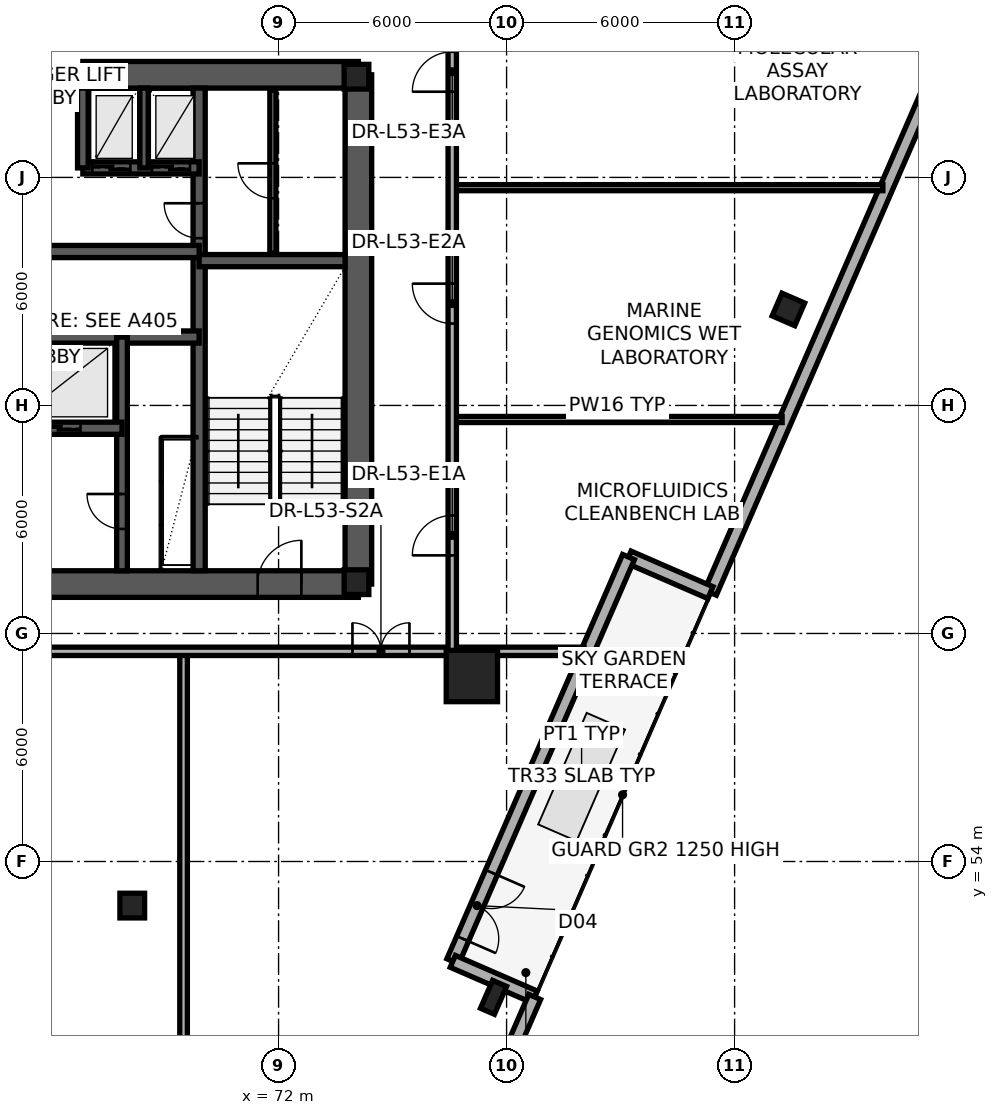
"""IFC4 building model, lengths in metres.
Left out: names, types, materials, properties, quantities, classifications, styles, units other than length and angle.
Written with IfcOpenShell. Run it as: python <this file> out.ifc"""

import sys

from ifc_helpers import new_model, si_unit, direction, frame, frame_2d, origin, origin_2d, place, context, subcontext, project, spatial, rectangle, extrude, element, fill, save


model = new_model("IFC4")
c1 = context("Model", 3, precision=1e-05, world=origin(), true_north=direction((0.0, 1.0)))
c2 = subcontext(c1, "Body", "Model", "MODEL_VIEW")
j1 = project(units=[si_unit("LENGTHUNIT", "METRE"), si_unit("PLANEANGLEUNIT", "RADIAN")], contexts=[c1])
p1 = place(None, origin())
s1 = spatial("IfcSite", under=j1, at=p1, CompositionType="ELEMENT")
p2 = place(p1, origin())
s2 = spatial("IfcBuilding", under=s1, at=p2, CompositionType="ELEMENT")
p3 = place(p2, frame((0.0, 0.0, 201.3)))
s3 = spatial("IfcBuildingStorey", under=s2, at=p3, CompositionType="ELEMENT", Elevation=201.3)
p4 = place(p3, frame((57.9, 61.3, 0.0), z_axis=(0.0, 0.0, 1.0), x_axis=(1.0, 0.0, 0.0)))
e1 = element("IfcWall", 1, at=p4, inside=s3, PredefinedType="SHEAR", context=c2, shape_type="SweptSolid", body=[
    extrude(rectangle(XDim=16.2, YDim=0.7, at=frame_2d((8.1, 0.0))), origin(), (0.0, 0.0, 1.0), 3.65),
])
p5 = place(p4, frame((1.35, 0.0, 0.0)))
e2 = element("IfcOpeningElement", 2, at=p5, cuts=e1, PredefinedType="OPENING", context=c2, shape_type="SweptSolid", body=[
    extrude(rectangle(XDim=1.15, YDim=2.15, at=frame_2d((0.575, 1.075))), frame((0.0, 0.36, 0.0), z_axis=(0.0, -1.0, 0.0), x_axis=(1.0, 0.0, 0.0)), (0.0, 0.0, 1.0), 0.72),
])
p6 = place(p4, frame((6.1, 0.0, 0.0)))
e3 = element("IfcOpeningElement", 3, at=p6, cuts=e1, PredefinedType="OPENING", context=c2, shape_type="SweptSolid", body=[
    extrude(rectangle(XDim=1.6, YDim=2.15, at=frame_2d((0.8, 1.075))), frame((0.0, 0.36, 0.0), z_axis=(0.0, -1.0, 0.0), x_axis=(1.0, 0.0, 0.0)), (0.0, 0.0, 1.0), 0.72),
])
p7 = place(p4, frame((13.55, 0.0, 0.0)))
e4 = element("IfcOpeningElement", 4, at=p7, cuts=e1, PredefinedType="OPENING", context=c2, shape_type="SweptSolid", body=[
    extrude(rectangle(XDim=1.15, YDim=2.15, at=frame_2d((0.575, 1.075))), frame((0.0, 0.36, 0.0), z_axis=(0.0, -1.0, 0.0), x_axis=(1.0, 0.0, 0.0)), (0.0, 0.0, 1.0), 0.72),
])
p8 = place(p3, frame((74.1, 61.3, 0.0), z_axis=(0.0, 0.0, 1.0), x_axis=(0.0, 1.0, 0.0)))
e5 = element("IfcWall", 5, at=p8, inside=s3, PredefinedType="SHEAR", context=c2, shape_type="SweptSolid", body=[
    extrude(rectangle(XDim=13.4, YDim=0.7, at=frame_2d((6.7, 0.0))), origin(), (0.0, 0.0, 1.0), 3.65),
])
p9 = place(p3, frame((74.1, 74.7, 0.0), z_axis=(0.0, 0.0, 1.0), x_axis=(-1.0, 0.0, 0.0)))
e6 = element("IfcWall", 6, at=p9, inside=s3, PredefinedType="SHEAR", context=c2, shape_type="SweptSolid", body=[
    extrude(rectangle(XDim=7.25, YDim=0.7, at=frame_2d((3.625, 0.0))), origin(), (0.0, 0.0, 1.0), 3.65),
])
p10 = place(p3, frame((69.91, 61.65, 0.0), z_axis=(0.0, 0.0, 1.0), x_axis=(0.0, 1.0, 0.0)))
e7 = element("IfcWall", 7, at=p10, inside=s3, PredefinedType="SHEAR", context=c2, shape_type="SweptSolid", body=[
    extrude(rectangle(XDim=12.7, YDim=0.32, at=frame_2d((6.35, 0.0))), origin(), (0.0, 0.0, 1.0), 3.65),
])
p11 = place(p10, frame((8.75, 0.0, 0.0)))
e8 = element("IfcOpeningElement", 8, at=p11, cuts=e7, PredefinedType="OPENING", context=c2, shape_type="SweptSolid", body=[
    extrude(rectangle(XDim=0.92, YDim=2.05, at=frame_2d((0.46, 1.025))), frame((0.0, 0.17, 0.0), z_axis=(0.0, -1.0, 0.0), x_axis=(1.0, 0.0, 0.0)), (0.0, 0.0, 1.0), 0.34),
])
p12 = place(p3, frame((69.91, 69.81, 0.0), z_axis=(0.0, 0.0, 1.0), x_axis=(1.0, 0.0, 0.0)))
e9 = element("IfcWall", 9, at=p12, inside=s3, PredefinedType="SHEAR", context=c2, shape_type="SweptSolid", body=[
    extrude(rectangle(XDim=3.84, YDim=0.32, at=frame_2d((1.92, 0.0))), origin(), (0.0, 0.0, 1.0), 3.65),
])
p13 = place(p3, frame((62.09, 67.8, 0.0), z_axis=(0.0, 0.0, 1.0), x_axis=(1.0, 0.0, 0.0)))
e10 = element("IfcWall", 10, at=p13, inside=s3, PredefinedType="SHEAR", context=c2, shape_type="SweptSolid", body=[
    extrude(rectangle(XDim=7.82, YDim=0.32, at=frame_2d((3.91, 0.0))), origin(), (0.0, 0.0, 1.0), 3.65),
])
p14 = place(p3, frame((62.09, 70.05, 0.0), z_axis=(0.0, 0.0, 1.0), x_axis=(1.0, 0.0, 0.0)))
e11 = element("IfcWall", 11, at=p14, inside=s3, PredefinedType="SHEAR", context=c2, shape_type="SweptSolid", body=[
    extrude(rectangle(XDim=7.82, YDim=0.32, at=frame_2d((3.91, 0.0))), origin(), (0.0, 0.0, 1.0), 3.65),
])
p15 = place(p14, frame((2.2, 0.0, 0.0)))
e12 = element("IfcOpeningElement", 12, at=p15, cuts=e11, PredefinedType="OPENING", context=c2, shape_type="SweptSolid", body=[
    extrude(rectangle(XDim=1.05, YDim=2.15, at=frame_2d((0.525, 1.075))), frame((0.0, 0.17, 0.0), z_axis=(0.0, -1.0, 0.0), x_axis=(1.0, 0.0, 0.0)), (0.0, 0.0, 1.0), 0.34),
])
p16 = place(p3, frame((66.85, 72.25, 0.0), z_axis=(0.0, 0.0, 1.0), x_axis=(1.0, 0.0, 0.0)))
e13 = element("IfcWall", 13, at=p16, inside=s3, PredefinedType="SHEAR", context=c2, shape_type="SweptSolid", body=[
    extrude(rectangle(XDim=3.06, YDim=0.32, at=frame_2d((1.53, 0.0))), origin(), (0.0, 0.0, 1.0), 3.65),
])
p17 = place(p16, frame((0.25, 0.0, 0.0)))
e14 = element("IfcOpeningElement", 14, at=p17, cuts=e13, PredefinedType="OPENING", context=c2, shape_type="SweptSolid", body=[
    extrude(rectangle(XDim=1.0, YDim=2.2, at=frame_2d((0.5, 1.1))), frame((0.0, 0.17, 0.0), z_axis=(0.0, -1.0, 0.0), x_axis=(1.0, 0.0, 0.0)), (0.0, 0.0, 1.0), 0.34),
])
p18 = place(p16, frame((1.82, 0.0, 0.0)))
e15 = element("IfcOpeningElement", 15, at=p18, cuts=e13, PredefinedType="OPENING", context=c2, shape_type="SweptSolid", body=[
    extrude(rectangle(XDim=1.0, YDim=2.2, at=frame_2d((0.5, 1.1))), frame((0.0, 0.17, 0.0), z_axis=(0.0, -1.0, 0.0), x_axis=(1.0, 0.0, 0.0)), (0.0, 0.0, 1.0), 0.34),
])
p19 = place(p3, frame((66.85, 72.25, 0.0), z_axis=(0.0, 0.0, 1.0), x_axis=(0.0, 1.0, 0.0)))
e16 = element("IfcWall", 16, at=p19, inside=s3, PredefinedType="SHEAR", context=c2, shape_type="SweptSolid", body=[
    extrude(rectangle(XDim=2.1, YDim=0.28, at=frame_2d((1.05, 0.0))), origin(), (0.0, 0.0, 1.0), 3.65),
])
p20 = place(p3, frame((68.46, 72.25, 0.0), z_axis=(0.0, 0.0, 1.0), x_axis=(0.0, 1.0, 0.0)))
e17 = element("IfcWall", 17, at=p20, inside=s3, PredefinedType="SHEAR", context=c2, shape_type="SweptSolid", body=[
    extrude(rectangle(XDim=2.1, YDim=0.22, at=frame_2d((1.05, 0.0))), origin(), (0.0, 0.0, 1.0), 3.65),
])
p21 = place(p3, frame((67.88, 61.65, 0.0), z_axis=(0.0, 0.0, 1.0), x_axis=(0.0, 1.0, 0.0)))
e18 = element("IfcWall", 18, at=p21, inside=s3, PredefinedType="SHEAR", context=c2, shape_type="SweptSolid", body=[
    extrude(rectangle(XDim=6.15, YDim=0.28, at=frame_2d((3.075, 0.0))), origin(), (0.0, 0.0, 1.0), 3.65),
])
p22 = place(p21, frame((1.1, 0.0, 0.0)))
e19 = element("IfcOpeningElement", 19, at=p22, cuts=e18, PredefinedType="OPENING", context=c2, shape_type="SweptSolid", body=[
    extrude(rectangle(XDim=0.92, YDim=2.05, at=frame_2d((0.46, 1.025))), frame((0.0, 0.15, 0.0), z_axis=(0.0, -1.0, 0.0), x_axis=(1.0, 0.0, 0.0)), (0.0, 0.0, 1.0), 0.3),
])
p23 = place(p3, frame((62.09, 65.4, 0.0), z_axis=(0.0, 0.0, 1.0), x_axis=(1.0, 0.0, 0.0)))
e20 = element("IfcWall", 20, at=p23, inside=s3, PredefinedType="SHEAR", context=c2, shape_type="SweptSolid", body=[
    extrude(rectangle(XDim=5.79, YDim=0.32, at=frame_2d((2.895, 0.0))), origin(), (0.0, 0.0, 1.0), 3.65),
])
p24 = place(p23, frame((0.75, 0.0, 0.0)))
e21 = element("IfcOpeningElement", 21, at=p24, cuts=e20, PredefinedType="OPENING", context=c2, shape_type="SweptSolid", body=[
    extrude(rectangle(XDim=1.1, YDim=2.2, at=frame_2d((0.55, 1.1))), frame((0.0, 0.17, 0.0), z_axis=(0.0, -1.0, 0.0), x_axis=(1.0, 0.0, 0.0)), (0.0, 0.0, 1.0), 0.34),
])
p25 = place(p23, frame((3.6, 0.0, 0.0)))
e22 = element("IfcOpeningElement", 22, at=p25, cuts=e20, PredefinedType="OPENING", context=c2, shape_type="SweptSolid", body=[
    extrude(rectangle(XDim=1.1, YDim=2.2, at=frame_2d((0.55, 1.1))), frame((0.0, 0.17, 0.0), z_axis=(0.0, -1.0, 0.0), x_axis=(1.0, 0.0, 0.0)), (0.0, 0.0, 1.0), 0.34),
])
for number, where, z_axis, x_axis in (
    (23, (74.05, 61.35, 0.0), (0.0, 0.0, 1.0), (1.0, 0.0, 0.0)),
    (24, (74.05, 74.65, 0.0), (0.0, 0.0, 1.0), (1.0, 0.0, 0.0)),
    (25, (68.15, 52.84, 0.0), (0.0, 0.0, 1.0), (1.0, 0.0, 0.0)),
):
    element("IfcColumn", number, at=place(p3, frame(where, z_axis=z_axis, x_axis=x_axis)), inside=s3, PredefinedType="COLUMN", context=c2, shape_type="SweptSolid", body=[
        extrude(rectangle(XDim=0.65, YDim=0.65, at=origin_2d()), origin(), (0.0, 0.0, 1.0), 3.65),
    ])
p26 = place(p3, frame((77.086, 58.88, 0.0), z_axis=(0.0, 0.0, 1.0), x_axis=(1.0, 0.0, 0.0)))
e26 = element("IfcColumn", 26, at=p26, inside=s3, PredefinedType="COLUMN", context=c2, shape_type="SweptSolid", body=[
    extrude(rectangle(XDim=1.35, YDim=1.35, at=origin_2d()), origin(), (0.0, 0.0, 1.0), 3.65),
])
p27 = place(p3, frame((77.692, 50.356, 0.003), z_axis=(-0.019612004119, 0.038286915892, 0.999074312234), x_axis=(0.062860529259, -0.99724229671, 0.039450671901)))
e27 = element("IfcColumn", 27, at=p27, inside=s3, PredefinedType="PILASTER", context=c2, shape_type="SweptSolid", body=[
    extrude(rectangle(XDim=0.8, YDim=0.4, at=origin_2d()), origin(), (0.0, 0.0, 1.0), 3.647),
])
p28 = place(p3, frame((85.487, 68.536, 0.003), z_axis=(-0.039229493406, -0.00569028488, 0.999214024874), x_axis=(0.964102718785, -0.263029272367, 0.036353122408)))
e28 = element("IfcColumn", 28, at=p28, inside=s3, PredefinedType="COLUMN", context=c2, shape_type="SweptSolid", body=[
    extrude(rectangle(XDim=0.65, YDim=0.65, at=origin_2d()), origin(), (0.0, 0.0, 1.0), 3.647),
])
p29 = place(p3, frame((91.334, 79.412, 0.0), z_axis=(0.0, 0.0, 1.0), x_axis=(-0.398629672145, -0.917111980341, 0.0)))
e29 = element("IfcWall", 29, at=p29, inside=s3, PredefinedType="STANDARD", context=c2, shape_type="SweptSolid", body=[
    extrude(rectangle(XDim=19.995, YDim=0.34, at=frame_2d((9.998, 0.0))), origin(), (0.0, 0.0, 1.0), 0.85),
])
p30 = place(p3, frame((83.364, 61.074, 0.0), z_axis=(0.0, 0.0, 1.0), x_axis=(-0.917155923187, 0.398528559282, 0.0)))
e30 = element("IfcWall", 30, at=p30, inside=s3, PredefinedType="STANDARD", context=c2, shape_type="SweptSolid", body=[
    extrude(rectangle(XDim=2.35, YDim=0.34, at=frame_2d((1.175, 0.0))), origin(), (0.0, 0.0, 1.0), 2.6),
])
p31 = place(p3, frame((81.208, 62.011, 0.0), z_axis=(0.0, 0.0, 1.0), x_axis=(-0.398626061538, -0.917113549711, 0.0)))
e31 = element("IfcWall", 31, at=p31, inside=s3, PredefinedType="STANDARD", context=c2, shape_type="SweptSolid", body=[
    extrude(rectangle(XDim=11.6, YDim=0.34, at=frame_2d((5.8, 0.0))), origin(), (0.0, 0.0, 1.0), 3.4),
])
p32 = place(p31, frame((9.05, 0.0, 0.0)))
e32 = element("IfcOpeningElement", 32, at=p32, cuts=e31, PredefinedType="OPENING", context=c2, shape_type="SweptSolid", body=[
    extrude(rectangle(XDim=1.9, YDim=2.3, at=frame_2d((0.95, 1.15))), frame((0.0, 0.18, 0.0), z_axis=(0.0, -1.0, 0.0), x_axis=(1.0, 0.0, 0.0)), (0.0, 0.0, 1.0), 0.36),
])
p33 = place(p3, frame((76.584, 51.373, 0.0), z_axis=(0.0, 0.0, 1.0), x_axis=(0.917101437334, -0.398653927161, 0.0)))
e33 = element("IfcWall", 33, at=p33, inside=s3, PredefinedType="STANDARD", context=c2, shape_type="SweptSolid", body=[
    extrude(rectangle(XDim=2.35, YDim=0.34, at=frame_2d((1.175, 0.0))), origin(), (0.0, 0.0, 1.0), 2.6),
])
p34 = place(p3, frame((78.74, 50.436, 0.0), z_axis=(0.0, 0.0, 1.0), x_axis=(-0.39861940237, -0.917116444109, 0.0)))
e34 = element("IfcWall", 34, at=p34, inside=s3, PredefinedType="STANDARD", context=c2, shape_type="SweptSolid", body=[
    extrude(rectangle(XDim=19.995, YDim=0.34, at=frame_2d((9.998, 0.0))), origin(), (0.0, 0.0, 1.0), 0.85),
])
p35 = place(p3, frame((71.85, 70.0, 0.0), z_axis=(0.0, 0.0, 1.0), x_axis=(0.0, 1.0, 0.0)))
e35 = element("IfcWall", 35, at=p35, inside=s3, PredefinedType="PARTITIONING", context=c2, shape_type="SweptSolid", body=[
    extrude(rectangle(XDim=4.3, YDim=0.16, at=frame_2d((2.15, 0.0))), origin(), (0.0, 0.0, 1.0), 3.4),
])
p36 = place(p35, frame((1.45, 0.0, 0.0)))
e36 = element("IfcOpeningElement", 36, at=p36, cuts=e35, PredefinedType="OPENING", context=c2, shape_type="SweptSolid", body=[
    extrude(rectangle(XDim=0.92, YDim=2.05, at=frame_2d((0.46, 1.025))), frame((0.0, 0.09, 0.0), z_axis=(0.0, -1.0, 0.0), x_axis=(1.0, 0.0, 0.0)), (0.0, 0.0, 1.0), 0.18),
])
p37 = place(p3, frame((69.5, 30.977, 0.0), z_axis=(0.0, 0.0, 1.0), x_axis=(0.0, 1.0, 0.0)))
e37 = element("IfcWall", 37, at=p37, inside=s3, PredefinedType="PARTITIONING", context=c2, shape_type="SweptSolid", body=[
    extrude(rectangle(XDim=28.553, YDim=0.2, at=frame_2d((14.277, 0.0))), origin(), (0.0, 0.0, 1.0), 2.6),
])
p38 = place(p3, frame((49.4, 59.53, 0.0), z_axis=(0.0, 0.0, 1.0), x_axis=(1.0, 0.0, 0.0)))
e38 = element("IfcWall", 38, at=p38, inside=s3, PredefinedType="PARTITIONING", context=c2, shape_type="SweptSolid", body=[
    extrude(rectangle(XDim=30.637, YDim=0.22, at=frame_2d((15.319, 0.0))), origin(), (0.0, 0.0, 1.0), 2.6),
])
p39 = place(p38, frame((9.375, 0.0, 0.0)))
e39 = element("IfcOpeningElement", 39, at=p39, cuts=e38, PredefinedType="OPENING", context=c2, shape_type="SweptSolid", body=[
    extrude(rectangle(XDim=1.5, YDim=2.2, at=frame_2d((0.75, 1.1))), frame((0.0, 0.12, 0.0), z_axis=(0.0, -1.0, 0.0), x_axis=(1.0, 0.0, 0.0)), (0.0, 0.0, 1.0), 0.24),
])
p40 = place(p38, frame((24.544, 0.0, 0.0)))
e40 = element("IfcOpeningElement", 40, at=p40, cuts=e38, PredefinedType="OPENING", context=c2, shape_type="SweptSolid", body=[
    extrude(rectangle(XDim=1.5, YDim=2.2, at=frame_2d((0.75, 1.1))), frame((0.0, 0.12, 0.0), z_axis=(0.0, -1.0, 0.0), x_axis=(1.0, 0.0, 0.0)), (0.0, 0.0, 1.0), 0.24),
])
p41 = place(p3, frame((76.57, 65.63, 0.0), z_axis=(0.0, 0.0, 1.0), x_axis=(1.0, 0.0, 0.0)))
e41 = element("IfcWall", 41, at=p41, inside=s3, PredefinedType="PARTITIONING", context=c2, shape_type="SweptSolid", body=[
    extrude(rectangle(XDim=8.681, YDim=0.16, at=frame_2d((4.341, 0.0))), origin(), (0.0, 0.0, 1.0), 2.6),
])
p42 = place(p3, frame((76.57, 71.73, 0.0), z_axis=(0.0, 0.0, 1.0), x_axis=(1.0, 0.0, 0.0)))
e42 = element("IfcWall", 42, at=p42, inside=s3, PredefinedType="PARTITIONING", context=c2, shape_type="SweptSolid", body=[
    extrude(rectangle(XDim=11.333, YDim=0.16, at=frame_2d((5.666, 0.0))), origin(), (0.0, 0.0, 1.0), 2.6),
])
p43 = place(p3, frame((76.57, 59.53, 0.0), z_axis=(0.0, 0.0, 1.0), x_axis=(0.0, 1.0, 0.0)))
e43 = element("IfcWall", 43, at=p43, inside=s3, PredefinedType="PARTITIONING", context=c2, shape_type="SweptSolid", body=[
    extrude(rectangle(XDim=18.3, YDim=0.22, at=frame_2d((9.15, 0.0))), origin(), (0.0, 0.0, 1.0), 2.78),
])
p44 = place(p43, frame((2.525, 0.0, 0.0)))
e44 = element("IfcOpeningElement", 44, at=p44, cuts=e43, PredefinedType="OPENING", context=c2, shape_type="SweptSolid", body=[
    extrude(rectangle(XDim=1.05, YDim=2.15, at=frame_2d((0.525, 1.075))), frame((0.0, 0.12, 0.0), z_axis=(0.0, -1.0, 0.0), x_axis=(1.0, 0.0, 0.0)), (0.0, 0.0, 1.0), 0.24),
])
p45 = place(p43, frame((8.625, 0.0, 0.0)))
e45 = element("IfcOpeningElement", 45, at=p45, cuts=e43, PredefinedType="OPENING", context=c2, shape_type="SweptSolid", body=[
    extrude(rectangle(XDim=1.05, YDim=2.15, at=frame_2d((0.525, 1.075))), frame((0.0, 0.12, 0.0), z_axis=(0.0, -1.0, 0.0), x_axis=(1.0, 0.0, 0.0)), (0.0, 0.0, 1.0), 0.24),
])
p46 = place(p43, frame((14.725, 0.0, 0.0)))
e46 = element("IfcOpeningElement", 46, at=p46, cuts=e43, PredefinedType="OPENING", context=c2, shape_type="SweptSolid", body=[
    extrude(rectangle(XDim=1.05, YDim=2.15, at=frame_2d((0.525, 1.075))), frame((0.0, 0.12, 0.0), z_axis=(0.0, -1.0, 0.0), x_axis=(1.0, 0.0, 0.0)), (0.0, 0.0, 1.0), 0.24),
])
p47 = place(p32, origin())
e47 = element("IfcDoor", 47, at=p47, inside=s3, OperationType="DOUBLE_DOOR_SINGLE_SWING", PredefinedType="DOOR", context=c2, shape_type="SweptSolid", body=[
    extrude(rectangle(XDim=1.9, YDim=2.3, at=frame_2d((0.95, 1.15))), frame((0.0, 0.025, 0.0), z_axis=(0.0, -1.0, 0.0), x_axis=(1.0, 0.0, 0.0)), (0.0, 0.0, 1.0), 0.05),
])
fill(e32, e47)
p48 = place(p22, origin())
e48 = element("IfcDoor", 48, at=p48, inside=s3, OperationType="SINGLE_SWING_RIGHT", PredefinedType="DOOR", context=c2, shape_type="SweptSolid", body=[
    extrude(rectangle(XDim=0.92, YDim=2.05, at=frame_2d((0.46, 1.025))), frame((0.0, 0.025, 0.0), z_axis=(0.0, -1.0, 0.0), x_axis=(1.0, 0.0, 0.0)), (0.0, 0.0, 1.0), 0.05),
])
fill(e19, e48)
p49 = place(p25, origin())
e49 = element("IfcDoor", 49, at=p49, inside=s3, OperationType="SLIDING_TO_LEFT", PredefinedType="DOOR", context=c2, shape_type="SweptSolid", body=[
    extrude(rectangle(XDim=1.1, YDim=2.2, at=frame_2d((0.55, 1.1))), frame((0.0, 0.025, 0.0), z_axis=(0.0, -1.0, 0.0), x_axis=(1.0, 0.0, 0.0)), (0.0, 0.0, 1.0), 0.05),
])
fill(e22, e49)
p50 = place(p17, origin())
e50 = element("IfcDoor", 50, at=p50, inside=s3, OperationType="SLIDING_TO_LEFT", PredefinedType="DOOR", context=c2, shape_type="SweptSolid", body=[
    extrude(rectangle(XDim=1.0, YDim=2.2, at=frame_2d((0.5, 1.1))), frame((0.0, 0.025, 0.0), z_axis=(0.0, -1.0, 0.0), x_axis=(1.0, 0.0, 0.0)), (0.0, 0.0, 1.0), 0.05),
])
fill(e14, e50)
p51 = place(p18, origin())
e51 = element("IfcDoor", 51, at=p51, inside=s3, OperationType="SLIDING_TO_LEFT", PredefinedType="DOOR", context=c2, shape_type="SweptSolid", body=[
    extrude(rectangle(XDim=1.0, YDim=2.2, at=frame_2d((0.5, 1.1))), frame((0.0, 0.025, 0.0), z_axis=(0.0, -1.0, 0.0), x_axis=(1.0, 0.0, 0.0)), (0.0, 0.0, 1.0), 0.05),
])
fill(e15, e51)
p52 = place(p7, origin())
e52 = element("IfcDoor", 52, at=p52, inside=s3, OperationType="SINGLE_SWING_RIGHT", PredefinedType="DOOR", context=c2, shape_type="SweptSolid", body=[
    extrude(rectangle(XDim=1.15, YDim=2.15, at=frame_2d((0.575, 1.075))), frame((0.0, 0.025, 0.0), z_axis=(0.0, -1.0, 0.0), x_axis=(1.0, 0.0, 0.0)), (0.0, 0.0, 1.0), 0.05),
])
fill(e4, e52)
p53 = place(p11, origin())
e53 = element("IfcDoor", 53, at=p53, inside=s3, OperationType="SINGLE_SWING_RIGHT", PredefinedType="DOOR", context=c2, shape_type="SweptSolid", body=[
    extrude(rectangle(XDim=0.92, YDim=2.05, at=frame_2d((0.46, 1.025))), frame((0.0, 0.025, 0.0), z_axis=(0.0, -1.0, 0.0), x_axis=(1.0, 0.0, 0.0)), (0.0, 0.0, 1.0), 0.05),
])
fill(e8, e53)
p54 = place(p36, origin())
e54 = element("IfcDoor", 54, at=p54, inside=s3, OperationType="SINGLE_SWING_RIGHT", PredefinedType="DOOR", context=c2, shape_type="SweptSolid", body=[
    extrude(rectangle(XDim=0.92, YDim=2.05, at=frame_2d((0.46, 1.025))), frame((0.0, 0.025, 0.0), z_axis=(0.0, -1.0, 0.0), x_axis=(1.0, 0.0, 0.0)), (0.0, 0.0, 1.0), 0.05),
])
fill(e36, e54)
p55 = place(p40, origin())
e55 = element("IfcDoor", 55, at=p55, inside=s3, OperationType="DOUBLE_DOOR_SINGLE_SWING", PredefinedType="DOOR", context=c2, shape_type="SweptSolid", body=[
    extrude(rectangle(XDim=1.5, YDim=2.2, at=frame_2d((0.75, 1.1))), frame((0.0, 0.025, 0.0), z_axis=(0.0, -1.0, 0.0), x_axis=(1.0, 0.0, 0.0)), (0.0, 0.0, 1.0), 0.05),
])
fill(e40, e55)
p56 = place(p44, origin())
e56 = element("IfcDoor", 56, at=p56, inside=s3, OperationType="SINGLE_SWING_LEFT", PredefinedType="DOOR", context=c2, shape_type="SweptSolid", body=[
    extrude(rectangle(XDim=1.05, YDim=2.15, at=frame_2d((0.525, 1.075))), frame((0.0, 0.025, 0.0), z_axis=(0.0, -1.0, 0.0), x_axis=(1.0, 0.0, 0.0)), (0.0, 0.0, 1.0), 0.05),
])
fill(e44, e56)
p57 = place(p45, origin())
e57 = element("IfcDoor", 57, at=p57, inside=s3, OperationType="SINGLE_SWING_RIGHT", PredefinedType="DOOR", context=c2, shape_type="SweptSolid", body=[
    extrude(rectangle(XDim=1.05, YDim=2.15, at=frame_2d((0.525, 1.075))), frame((0.0, 0.025, 0.0), z_axis=(0.0, -1.0, 0.0), x_axis=(1.0, 0.0, 0.0)), (0.0, 0.0, 1.0), 0.05),
])
fill(e45, e57)
p58 = place(p46, origin())
e58 = element("IfcDoor", 58, at=p58, inside=s3, OperationType="SINGLE_SWING_LEFT", PredefinedType="DOOR", context=c2, shape_type="SweptSolid", body=[
    extrude(rectangle(XDim=1.05, YDim=2.15, at=frame_2d((0.525, 1.075))), frame((0.0, 0.025, 0.0), z_axis=(0.0, -1.0, 0.0), x_axis=(1.0, 0.0, 0.0)), (0.0, 0.0, 1.0), 0.05),
])
fill(e46, e58)
save(model, sys.argv[1])
